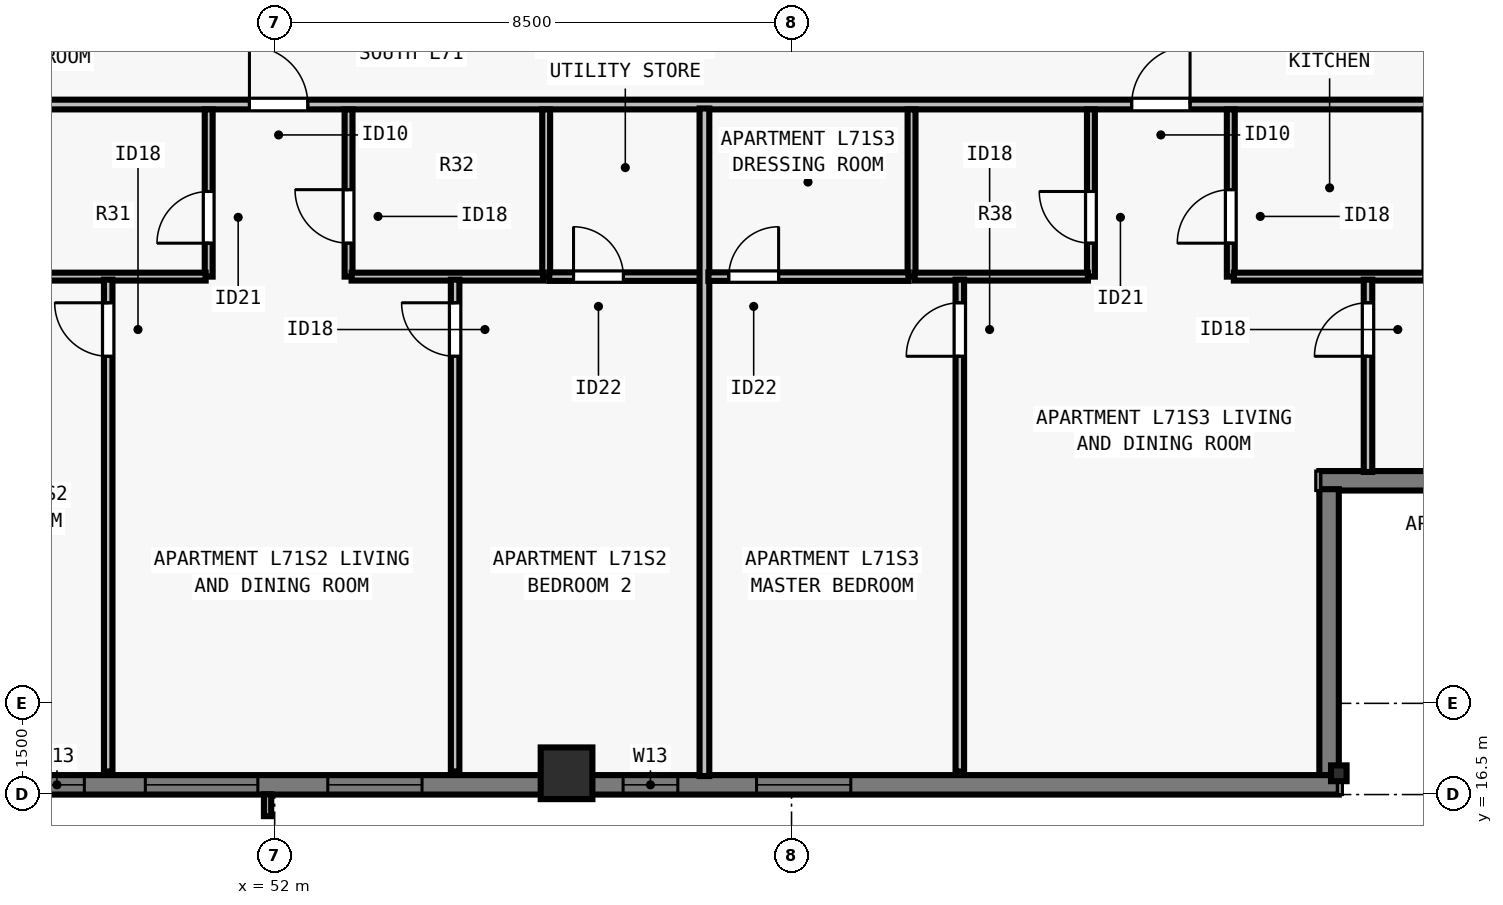
"""IFC4 building model, lengths in metres.
Left out: names, types, materials, properties, quantities, classifications, styles, units other than length and angle.
Written with IfcOpenShell. Run it as: python <this file> out.ifc"""

import sys

from ifc_helpers import new_model, si_unit, direction, frame, frame_2d, origin, origin_2d, place, context, subcontext, project, spatial, rectangle, i_section, extrude, element, fill, save


model = new_model("IFC4")
c1 = context("Model", 3, precision=1e-05, world=origin(), true_north=direction((0.0, 1.0)))
c2 = subcontext(c1, "Body", "Model", "MODEL_VIEW")
j1 = project(units=[si_unit("LENGTHUNIT", "METRE"), si_unit("PLANEANGLEUNIT", "RADIAN")], contexts=[c1])
p1 = place(None, origin())
s1 = spatial("IfcSite", under=j1, at=p1, CompositionType="ELEMENT")
p2 = place(p1, origin())
s2 = spatial("IfcBuilding", under=s1, at=p2, CompositionType="ELEMENT")
p3 = place(p2, frame((0.0, 0.0, 258.5)))
s3 = spatial("IfcBuildingStorey", under=s2, at=p3, CompositionType="ELEMENT", Elevation=258.5)
p4 = place(p3, frame((56.8, 16.85, 0.0), z_axis=(0.0, 0.0, 1.0), x_axis=(1.0, 0.0, 0.0)))
e1 = element("IfcColumn", 1, at=p4, inside=s3, PredefinedType="COLUMN", context=c2, shape_type="SweptSolid", body=[
    extrude(rectangle(XDim=0.85, YDim=0.85, at=origin_2d()), origin(), (0.0, 0.0, 1.0), 3.5),
])
p5 = place(p3, frame((69.5, 16.85, 0.0), z_axis=(0.0, 0.0, 1.0), x_axis=(1.0, 0.0, 0.0)))
e2 = element("IfcColumn", 2, at=p5, inside=s3, PredefinedType="COLUMN", context=c2, shape_type="SweptSolid", body=[
    extrude(i_section(OverallWidth=0.256, OverallDepth=0.26, WebThickness=0.01, FlangeThickness=0.017, FilletRadius=0.013, at=origin_2d()), origin(), (0.0, 0.0, 1.0), 3.5),
])
p6 = place(p3, frame((74.5, 21.66, 0.0), z_axis=(0.0, 0.0, 1.0), x_axis=(-1.0, 0.0, 0.0)))
e3 = element("IfcWall", 3, at=p6, inside=s3, PredefinedType="SOLIDWALL", context=c2, shape_type="SweptSolid", body=[
    extrude(rectangle(XDim=5.32, YDim=0.32, at=frame_2d((2.66, 0.0))), origin(), (0.0, 0.0, 1.0), 3.29),
])
p7 = place(p6, frame((0.63, 0.0, 0.8)))
e4 = element("IfcOpeningElement", 4, at=p7, cuts=e3, PredefinedType="OPENING", context=c2, shape_type="SweptSolid", body=[
    extrude(rectangle(XDim=0.9, YDim=1.678, at=frame_2d((0.45, 0.839))), frame((0.0, 0.17, 0.0), z_axis=(0.0, -1.0, 0.0), x_axis=(1.0, 0.0, 0.0)), (0.0, 0.0, 1.0), 0.34),
])
p8 = place(p3, frame((69.34, 21.522, 0.0), z_axis=(0.0, 0.0, 1.0), x_axis=(0.0, -1.0, 0.0)))
e5 = element("IfcWall", 5, at=p8, inside=s3, PredefinedType="SOLIDWALL", context=c2, shape_type="SweptSolid", body=[
    extrude(rectangle(XDim=4.724, YDim=0.32, at=frame_2d((2.362, 0.0))), origin(), (0.0, 0.0, 1.0), 3.29),
])
p9 = place(p3, frame((69.5, 16.66, 0.0), z_axis=(0.0, 0.0, 1.0), x_axis=(-1.0, 0.0, 0.0)))
e6 = element("IfcWall", 6, at=p9, inside=s3, PredefinedType="SOLIDWALL", context=c2, shape_type="SweptSolid", body=[
    extrude(rectangle(XDim=24.202, YDim=0.32, at=frame_2d((12.101, 0.0))), origin(), (0.0, 0.0, 1.0), 3.29),
])
p10 = place(p9, frame((8.026, 0.0, 0.8)))
e7 = element("IfcOpeningElement", 7, at=p10, cuts=e6, PredefinedType="OPENING", context=c2, shape_type="SweptSolid", body=[
    extrude(rectangle(XDim=1.55, YDim=1.678, at=frame_2d((0.775, 0.839))), frame((0.0, 0.17, 0.0), z_axis=(0.0, -1.0, 0.0), x_axis=(1.0, 0.0, 0.0)), (0.0, 0.0, 1.0), 0.34),
])
p11 = place(p9, frame((15.076, 0.0, 0.8)))
e8 = element("IfcOpeningElement", 8, at=p11, cuts=e6, PredefinedType="OPENING", context=c2, shape_type="SweptSolid", body=[
    extrude(rectangle(XDim=1.55, YDim=1.678, at=frame_2d((0.775, 0.839))), frame((0.0, 0.17, 0.0), z_axis=(0.0, -1.0, 0.0), x_axis=(1.0, 0.0, 0.0)), (0.0, 0.0, 1.0), 0.34),
])
p12 = place(p9, frame((17.777, 0.0, 0.8)))
e9 = element("IfcOpeningElement", 9, at=p12, cuts=e6, PredefinedType="OPENING", context=c2, shape_type="SweptSolid", body=[
    extrude(rectangle(XDim=1.85, YDim=1.678, at=frame_2d((0.925, 0.839))), frame((0.0, 0.17, 0.0), z_axis=(0.0, -1.0, 0.0), x_axis=(1.0, 0.0, 0.0)), (0.0, 0.0, 1.0), 0.34),
])
p13 = place(p9, frame((20.63, 0.0, 0.8)))
e10 = element("IfcOpeningElement", 10, at=p13, cuts=e6, PredefinedType="OPENING", context=c2, shape_type="SweptSolid", body=[
    extrude(rectangle(XDim=0.9, YDim=1.678, at=frame_2d((0.45, 0.839))), frame((0.0, 0.17, 0.0), z_axis=(0.0, -1.0, 0.0), x_axis=(1.0, 0.0, 0.0)), (0.0, 0.0, 1.0), 0.34),
])
p14 = place(p9, frame((10.87, 0.0, 0.8)))
e11 = element("IfcOpeningElement", 11, at=p14, cuts=e6, PredefinedType="OPENING", context=c2, shape_type="SweptSolid", body=[
    extrude(rectangle(XDim=0.9, YDim=1.678, at=frame_2d((0.45, 0.839))), frame((0.0, 0.17, 0.0), z_axis=(0.0, -1.0, 0.0), x_axis=(1.0, 0.0, 0.0)), (0.0, 0.0, 1.0), 0.34),
])
p15 = place(p3, frame((29.805, 27.847, 0.0), z_axis=(0.0, 0.0, 1.0), x_axis=(1.0, 0.0, 0.0)))
e12 = element("IfcWall", 12, at=p15, inside=s3, PredefinedType="PARTITIONING", context=c2, shape_type="SweptSolid", body=[
    extrude(rectangle(XDim=44.39, YDim=0.16, at=frame_2d((22.195, 0.0))), origin(), (0.0, 0.0, 1.0), 2.958),
])
p16 = place(p15, frame((7.206, 0.0, 0.0)))
e13 = element("IfcOpeningElement", 13, at=p16, cuts=e12, PredefinedType="OPENING", context=c2, shape_type="SweptSolid", body=[
    extrude(rectangle(XDim=0.96, YDim=2.18, at=frame_2d((0.48, 1.09))), frame((0.0, 0.09, 0.0), z_axis=(0.0, -1.0, 0.0), x_axis=(1.0, 0.0, 0.0)), (0.0, 0.0, 1.0), 0.18),
])
p17 = place(p15, frame((21.78, 0.0, 0.0)))
e14 = element("IfcOpeningElement", 14, at=p17, cuts=e12, PredefinedType="OPENING", context=c2, shape_type="SweptSolid", body=[
    extrude(rectangle(XDim=0.96, YDim=2.18, at=frame_2d((0.48, 1.09))), frame((0.0, 0.09, 0.0), z_axis=(0.0, -1.0, 0.0), x_axis=(1.0, 0.0, 0.0)), (0.0, 0.0, 1.0), 0.18),
])
p18 = place(p15, frame((36.289, 0.0, 0.0)))
e15 = element("IfcOpeningElement", 15, at=p18, cuts=e12, PredefinedType="OPENING", context=c2, shape_type="SweptSolid", body=[
    extrude(rectangle(XDim=0.96, YDim=2.18, at=frame_2d((0.48, 1.09))), frame((0.0, 0.09, 0.0), z_axis=(0.0, -1.0, 0.0), x_axis=(1.0, 0.0, 0.0)), (0.0, 0.0, 1.0), 0.18),
])
p19 = place(p3, frame((50.915, 25.018, 0.0), z_axis=(0.0, 0.0, 1.0), x_axis=(0.0, 1.0, 0.0)))
e16 = element("IfcWall", 16, at=p19, inside=s3, PredefinedType="PLUMBINGWALL", context=c2, shape_type="SweptSolid", body=[
    extrude(rectangle(XDim=2.75, YDim=0.13, at=frame_2d((1.375, 0.0))), origin(), (0.0, 0.0, 1.0), 3.29),
])
p20 = place(p19, frame((0.55, 0.0, 0.0)))
e17 = element("IfcOpeningElement", 17, at=p20, cuts=e16, PredefinedType="OPENING", context=c2, shape_type="SweptSolid", body=[
    extrude(rectangle(XDim=0.85, YDim=2.08, at=frame_2d((0.425, 1.04))), frame((0.0, 0.075, 0.0), z_axis=(0.0, -1.0, 0.0), x_axis=(1.0, 0.0, 0.0)), (0.0, 0.0, 1.0), 0.15),
])
p21 = place(p3, frame((48.015, 25.018, 0.0), z_axis=(0.0, 0.0, 1.0), x_axis=(1.0, 0.0, 0.0)))
e18 = element("IfcWall", 18, at=p21, inside=s3, PredefinedType="PLUMBINGWALL", context=c2, shape_type="SweptSolid", body=[
    extrude(rectangle(XDim=2.85, YDim=0.13, at=frame_2d((1.425, 0.0))), origin(), (0.0, 0.0, 1.0), 3.29),
])
p22 = place(p3, frame((56.465, 25.018, 0.0), z_axis=(0.0, 0.0, 1.0), x_axis=(0.0, 1.0, 0.0)))
e19 = element("IfcWall", 19, at=p22, inside=s3, PredefinedType="PLUMBINGWALL", context=c2, shape_type="SweptSolid", body=[
    extrude(rectangle(XDim=2.75, YDim=0.13, at=frame_2d((1.375, 0.0))), origin(), (0.0, 0.0, 1.0), 3.29),
])
p23 = place(p3, frame((53.215, 25.018, 0.0), z_axis=(0.0, 0.0, 1.0), x_axis=(0.0, 1.0, 0.0)))
e20 = element("IfcWall", 20, at=p23, inside=s3, PredefinedType="PLUMBINGWALL", context=c2, shape_type="SweptSolid", body=[
    extrude(rectangle(XDim=2.75, YDim=0.13, at=frame_2d((1.375, 0.0))), origin(), (0.0, 0.0, 1.0), 2.958),
])
p24 = place(p23, frame((0.55, 0.0, 0.0)))
e21 = element("IfcOpeningElement", 21, at=p24, cuts=e20, PredefinedType="OPENING", context=c2, shape_type="SweptSolid", body=[
    extrude(rectangle(XDim=0.88, YDim=2.1, at=frame_2d((0.44, 1.05))), frame((0.0, 0.075, 0.0), z_axis=(0.0, -1.0, 0.0), x_axis=(1.0, 0.0, 0.0)), (0.0, 0.0, 1.0), 0.15),
])
p25 = place(p3, frame((53.265, 25.018, 0.0), z_axis=(0.0, 0.0, 1.0), x_axis=(1.0, 0.0, 0.0)))
e22 = element("IfcWall", 22, at=p25, inside=s3, PredefinedType="PLUMBINGWALL", context=c2, shape_type="SweptSolid", body=[
    extrude(rectangle(XDim=3.15, YDim=0.13, at=frame_2d((1.575, 0.0))), origin(), (0.0, 0.0, 1.0), 3.29),
])
p26 = place(p3, frame((49.262, 16.88, 0.0), z_axis=(0.0, 0.0, 1.0), x_axis=(0.0, 1.0, 0.0)))
e23 = element("IfcWall", 23, at=p26, inside=s3, PredefinedType="PARTITIONING", context=c2, shape_type="SweptSolid", body=[
    extrude(rectangle(XDim=8.088, YDim=0.14, at=frame_2d((4.044, 0.0))), origin(), (0.0, 0.0, 1.0), 2.958),
])
p27 = place(p26, frame((6.827, 0.0, 0.0)))
e24 = element("IfcOpeningElement", 24, at=p27, cuts=e23, PredefinedType="OPENING", context=c2, shape_type="SweptSolid", body=[
    extrude(rectangle(XDim=0.88, YDim=2.1, at=frame_2d((0.44, 1.05))), frame((0.0, 0.08, 0.0), z_axis=(0.0, -1.0, 0.0), x_axis=(1.0, 0.0, 0.0)), (0.0, 0.0, 1.0), 0.16),
])
p28 = place(p3, frame((54.968, 16.88, 0.0), z_axis=(0.0, 0.0, 1.0), x_axis=(0.0, 1.0, 0.0)))
e25 = element("IfcWall", 25, at=p28, inside=s3, PredefinedType="PARTITIONING", context=c2, shape_type="SweptSolid", body=[
    extrude(rectangle(XDim=8.088, YDim=0.14, at=frame_2d((4.044, 0.0))), origin(), (0.0, 0.0, 1.0), 3.29),
])
p29 = place(p28, frame((6.827, 0.0, 0.0)))
e26 = element("IfcOpeningElement", 26, at=p29, cuts=e25, PredefinedType="OPENING", context=c2, shape_type="SweptSolid", body=[
    extrude(rectangle(XDim=0.88, YDim=2.1, at=frame_2d((0.44, 1.05))), frame((0.0, 0.08, 0.0), z_axis=(0.0, -1.0, 0.0), x_axis=(1.0, 0.0, 0.0)), (0.0, 0.0, 1.0), 0.16),
])
p30 = place(p3, frame((56.515, 25.018, 0.0), z_axis=(0.0, 0.0, 1.0), x_axis=(1.0, 0.0, 0.0)))
e27 = element("IfcWall", 27, at=p30, inside=s3, PredefinedType="PARTITIONING", context=c2, shape_type="SweptSolid", body=[
    extrude(rectangle(XDim=2.603, YDim=0.14, at=frame_2d((1.301, 0.0))), origin(), (0.0, 0.0, 1.0), 3.29),
])
p31 = place(p30, frame((0.4, 0.0, 0.0)))
e28 = element("IfcOpeningElement", 28, at=p31, cuts=e27, PredefinedType="OPENING", context=c2, shape_type="SweptSolid", body=[
    extrude(rectangle(XDim=0.82, YDim=2.1, at=frame_2d((0.41, 1.05))), frame((0.0, 0.08, 0.0), z_axis=(0.0, -1.0, 0.0), x_axis=(1.0, 0.0, 0.0)), (0.0, 0.0, 1.0), 0.16),
])
p32 = place(p3, frame((59.067, 16.805, 0.0), z_axis=(0.0, 0.0, 1.0), x_axis=(0.0, 1.0, 0.0)))
e29 = element("IfcWall", 29, at=p32, inside=s3, PredefinedType="PARTITIONING", context=c2, shape_type="SweptSolid", body=[
    extrude(rectangle(XDim=10.978, YDim=0.16, at=frame_2d((5.489, 0.0))), origin(), (0.0, 0.0, 1.0), 3.29),
])
p33 = place(p3, frame((62.474, 25.018, 0.0), z_axis=(0.0, 0.0, 1.0), x_axis=(0.0, 1.0, 0.0)))
e30 = element("IfcWall", 30, at=p33, inside=s3, PredefinedType="PLUMBINGWALL", context=c2, shape_type="SweptSolid", body=[
    extrude(rectangle(XDim=2.75, YDim=0.13, at=frame_2d((1.375, 0.0))), origin(), (0.0, 0.0, 1.0), 2.573),
])
p34 = place(p3, frame((65.424, 25.018, 0.0), z_axis=(0.0, 0.0, 1.0), x_axis=(0.0, 1.0, 0.0)))
e31 = element("IfcWall", 31, at=p34, inside=s3, PredefinedType="PLUMBINGWALL", context=c2, shape_type="SweptSolid", body=[
    extrude(rectangle(XDim=2.75, YDim=0.13, at=frame_2d((1.375, 0.0))), origin(), (0.0, 0.0, 1.0), 3.29),
])
p35 = place(p34, frame((0.55, 0.0, 0.0)))
e32 = element("IfcOpeningElement", 32, at=p35, cuts=e31, PredefinedType="OPENING", context=c2, shape_type="SweptSolid", body=[
    extrude(rectangle(XDim=0.85, YDim=2.08, at=frame_2d((0.425, 1.04))), frame((0.0, 0.075, 0.0), z_axis=(0.0, -1.0, 0.0), x_axis=(1.0, 0.0, 0.0)), (0.0, 0.0, 1.0), 0.15),
])
p36 = place(p3, frame((62.524, 25.018, 0.0), z_axis=(0.0, 0.0, 1.0), x_axis=(1.0, 0.0, 0.0)))
e33 = element("IfcWall", 33, at=p36, inside=s3, PredefinedType="PLUMBINGWALL", context=c2, shape_type="SweptSolid", body=[
    extrude(rectangle(XDim=2.85, YDim=0.13, at=frame_2d((1.425, 0.0))), origin(), (0.0, 0.0, 1.0), 3.29),
])
p37 = place(p3, frame((67.724, 25.018, 0.0), z_axis=(0.0, 0.0, 1.0), x_axis=(0.0, 1.0, 0.0)))
e34 = element("IfcWall", 34, at=p37, inside=s3, PredefinedType="PLUMBINGWALL", context=c2, shape_type="SweptSolid", body=[
    extrude(rectangle(XDim=2.75, YDim=0.13, at=frame_2d((1.375, 0.0))), origin(), (0.0, 0.0, 1.0), 3.29),
])
p38 = place(p37, frame((0.55, 0.0, 0.0)))
e35 = element("IfcOpeningElement", 35, at=p38, cuts=e34, PredefinedType="OPENING", context=c2, shape_type="SweptSolid", body=[
    extrude(rectangle(XDim=0.88, YDim=2.1, at=frame_2d((0.44, 1.05))), frame((0.0, 0.075, 0.0), z_axis=(0.0, -1.0, 0.0), x_axis=(1.0, 0.0, 0.0)), (0.0, 0.0, 1.0), 0.15),
])
p39 = place(p3, frame((67.774, 25.018, 0.0), z_axis=(0.0, 0.0, 1.0), x_axis=(1.0, 0.0, 0.0)))
e36 = element("IfcWall", 36, at=p39, inside=s3, PredefinedType="PLUMBINGWALL", context=c2, shape_type="SweptSolid", body=[
    extrude(rectangle(XDim=3.15, YDim=0.13, at=frame_2d((1.575, 0.0))), origin(), (0.0, 0.0, 1.0), 2.958),
])
p40 = place(p3, frame((63.268, 16.88, 0.0), z_axis=(0.0, 0.0, 1.0), x_axis=(0.0, 1.0, 0.0)))
e37 = element("IfcWall", 37, at=p40, inside=s3, PredefinedType="PARTITIONING", context=c2, shape_type="SweptSolid", body=[
    extrude(rectangle(XDim=8.088, YDim=0.14, at=frame_2d((4.044, 0.0))), origin(), (0.0, 0.0, 1.0), 3.29),
])
p41 = place(p40, frame((6.827, 0.0, 0.0)))
e38 = element("IfcOpeningElement", 38, at=p41, cuts=e37, PredefinedType="OPENING", context=c2, shape_type="SweptSolid", body=[
    extrude(rectangle(XDim=0.88, YDim=2.1, at=frame_2d((0.44, 1.05))), frame((0.0, 0.08, 0.0), z_axis=(0.0, -1.0, 0.0), x_axis=(1.0, 0.0, 0.0)), (0.0, 0.0, 1.0), 0.16),
])
p42 = place(p3, frame((59.133, 25.018, 0.0), z_axis=(0.0, 0.0, 1.0), x_axis=(1.0, 0.0, 0.0)))
e39 = element("IfcWall", 39, at=p42, inside=s3, PredefinedType="PARTITIONING", context=c2, shape_type="SweptSolid", body=[
    extrude(rectangle(XDim=3.291, YDim=0.14, at=frame_2d((1.646, 0.0))), origin(), (0.0, 0.0, 1.0), 3.29),
])
p43 = place(p42, frame((0.335, 0.0, 0.0)))
e40 = element("IfcOpeningElement", 40, at=p43, cuts=e39, PredefinedType="OPENING", context=c2, shape_type="SweptSolid", body=[
    extrude(rectangle(XDim=0.82, YDim=2.1, at=frame_2d((0.41, 1.05))), frame((0.0, 0.08, 0.0), z_axis=(0.0, -1.0, 0.0), x_axis=(1.0, 0.0, 0.0)), (0.0, 0.0, 1.0), 0.16),
])
p44 = place(p3, frame((69.98, 21.805, 0.0), z_axis=(0.0, 0.0, 1.0), x_axis=(0.0, 1.0, 0.0)))
e41 = element("IfcWall", 41, at=p44, inside=s3, PredefinedType="PARTITIONING", context=c2, shape_type="SweptSolid", body=[
    extrude(rectangle(XDim=3.163, YDim=0.14, at=frame_2d((1.581, 0.0))), origin(), (0.0, 0.0, 1.0), 3.29),
])
p45 = place(p44, frame((1.903, 0.0, 0.0)))
e42 = element("IfcOpeningElement", 42, at=p45, cuts=e41, PredefinedType="OPENING", context=c2, shape_type="SweptSolid", body=[
    extrude(rectangle(XDim=0.88, YDim=2.1, at=frame_2d((0.44, 1.05))), frame((0.0, 0.08, 0.0), z_axis=(0.0, -1.0, 0.0), x_axis=(1.0, 0.0, 0.0)), (0.0, 0.0, 1.0), 0.16),
])
p46 = place(p10, origin())
e43 = element("IfcWindow", 43, at=p46, inside=s3, PartitioningType="SINGLE_PANEL", PredefinedType="WINDOW", context=c2, shape_type="SweptSolid", body=[
    extrude(rectangle(XDim=1.55, YDim=1.678, at=frame_2d((0.775, 0.839))), frame((0.0, -0.05, 0.0), z_axis=(0.0, -1.0, 0.0), x_axis=(1.0, 0.0, 0.0)), (0.0, 0.0, 1.0), 0.06),
])
fill(e7, e43)
p47 = place(p11, origin())
e44 = element("IfcWindow", 44, at=p47, inside=s3, PartitioningType="SINGLE_PANEL", PredefinedType="WINDOW", context=c2, shape_type="SweptSolid", body=[
    extrude(rectangle(XDim=1.55, YDim=1.678, at=frame_2d((0.775, 0.839))), frame((0.0, -0.05, 0.0), z_axis=(0.0, -1.0, 0.0), x_axis=(1.0, 0.0, 0.0)), (0.0, 0.0, 1.0), 0.06),
])
fill(e8, e44)
p48 = place(p12, origin())
e45 = element("IfcWindow", 45, at=p48, inside=s3, PartitioningType="SINGLE_PANEL", PredefinedType="WINDOW", context=c2, shape_type="SweptSolid", body=[
    extrude(rectangle(XDim=1.85, YDim=1.678, at=frame_2d((0.925, 0.839))), frame((0.0, -0.05, 0.0), z_axis=(0.0, -1.0, 0.0), x_axis=(1.0, 0.0, 0.0)), (0.0, 0.0, 1.0), 0.06),
])
fill(e9, e45)
p49 = place(p13, origin())
e46 = element("IfcWindow", 46, at=p49, inside=s3, PartitioningType="SINGLE_PANEL", PredefinedType="WINDOW", context=c2, shape_type="SweptSolid", body=[
    extrude(rectangle(XDim=0.9, YDim=1.678, at=frame_2d((0.45, 0.839))), frame((0.0, -0.04, 0.0), z_axis=(0.0, -1.0, 0.0), x_axis=(1.0, 0.0, 0.0)), (0.0, 0.0, 1.0), 0.06),
])
fill(e10, e46)
p50 = place(p14, origin())
e47 = element("IfcWindow", 47, at=p50, inside=s3, PartitioningType="SINGLE_PANEL", PredefinedType="WINDOW", context=c2, shape_type="SweptSolid", body=[
    extrude(rectangle(XDim=0.9, YDim=1.678, at=frame_2d((0.45, 0.839))), frame((0.0, -0.04, 0.0), z_axis=(0.0, -1.0, 0.0), x_axis=(1.0, 0.0, 0.0)), (0.0, 0.0, 1.0), 0.06),
])
fill(e11, e47)
p51 = place(p20, origin())
e48 = element("IfcDoor", 48, at=p51, inside=s3, OperationType="SINGLE_SWING_LEFT", PredefinedType="DOOR", context=c2, shape_type="SweptSolid", body=[
    extrude(rectangle(XDim=0.85, YDim=2.08, at=frame_2d((0.425, 1.04))), frame((0.0, 0.025, 0.0), z_axis=(0.0, -1.0, 0.0), x_axis=(1.0, 0.0, 0.0)), (0.0, 0.0, 1.0), 0.05),
])
fill(e17, e48)
p52 = place(p24, origin())
e49 = element("IfcDoor", 49, at=p52, inside=s3, OperationType="SINGLE_SWING_RIGHT", PredefinedType="DOOR", context=c2, shape_type="SweptSolid", body=[
    extrude(rectangle(XDim=0.88, YDim=2.1, at=frame_2d((0.44, 1.05))), frame((0.0, 0.025, 0.0), z_axis=(0.0, -1.0, 0.0), x_axis=(1.0, 0.0, 0.0)), (0.0, 0.0, 1.0), 0.05),
])
fill(e21, e49)
p53 = place(p27, origin())
e50 = element("IfcDoor", 50, at=p53, inside=s3, OperationType="SINGLE_SWING_RIGHT", PredefinedType="DOOR", context=c2, shape_type="SweptSolid", body=[
    extrude(rectangle(XDim=0.88, YDim=2.1, at=frame_2d((0.44, 1.05))), frame((0.0, 0.025, 0.0), z_axis=(0.0, -1.0, 0.0), x_axis=(1.0, 0.0, 0.0)), (0.0, 0.0, 1.0), 0.05),
])
fill(e24, e50)
p54 = place(p31, origin())
e51 = element("IfcDoor", 51, at=p54, inside=s3, OperationType="SINGLE_SWING_LEFT", PredefinedType="DOOR", context=c2, shape_type="SweptSolid", body=[
    extrude(rectangle(XDim=0.82, YDim=2.1, at=frame_2d((0.41, 1.05))), frame((0.0, 0.025, 0.0), z_axis=(0.0, -1.0, 0.0), x_axis=(1.0, 0.0, 0.0)), (0.0, 0.0, 1.0), 0.05),
])
fill(e28, e51)
p55 = place(p29, origin())
e52 = element("IfcDoor", 52, at=p55, inside=s3, OperationType="SINGLE_SWING_RIGHT", PredefinedType="DOOR", context=c2, shape_type="SweptSolid", body=[
    extrude(rectangle(XDim=0.88, YDim=2.1, at=frame_2d((0.44, 1.05))), frame((0.0, 0.025, 0.0), z_axis=(0.0, -1.0, 0.0), x_axis=(1.0, 0.0, 0.0)), (0.0, 0.0, 1.0), 0.05),
])
fill(e26, e52)
p56 = place(p17, origin())
e53 = element("IfcDoor", 53, at=p56, inside=s3, OperationType="SINGLE_SWING_LEFT", PredefinedType="DOOR", context=c2, shape_type="SweptSolid", body=[
    extrude(rectangle(XDim=0.96, YDim=2.18, at=frame_2d((0.48, 1.09))), frame((0.0, 0.025, 0.0), z_axis=(0.0, -1.0, 0.0), x_axis=(1.0, 0.0, 0.0)), (0.0, 0.0, 1.0), 0.05),
])
fill(e14, e53)
p57 = place(p35, origin())
e54 = element("IfcDoor", 54, at=p57, inside=s3, OperationType="SINGLE_SWING_RIGHT", PredefinedType="DOOR", context=c2, shape_type="SweptSolid", body=[
    extrude(rectangle(XDim=0.85, YDim=2.08, at=frame_2d((0.425, 1.04))), frame((0.0, 0.025, 0.0), z_axis=(0.0, -1.0, 0.0), x_axis=(1.0, 0.0, 0.0)), (0.0, 0.0, 1.0), 0.05),
])
fill(e32, e54)
p58 = place(p38, origin())
e55 = element("IfcDoor", 55, at=p58, inside=s3, OperationType="SINGLE_SWING_LEFT", PredefinedType="DOOR", context=c2, shape_type="SweptSolid", body=[
    extrude(rectangle(XDim=0.88, YDim=2.1, at=frame_2d((0.44, 1.05))), frame((0.0, 0.025, 0.0), z_axis=(0.0, -1.0, 0.0), x_axis=(1.0, 0.0, 0.0)), (0.0, 0.0, 1.0), 0.05),
])
fill(e35, e55)
p59 = place(p43, origin())
e56 = element("IfcDoor", 56, at=p59, inside=s3, OperationType="SINGLE_SWING_RIGHT", PredefinedType="DOOR", context=c2, shape_type="SweptSolid", body=[
    extrude(rectangle(XDim=0.82, YDim=2.1, at=frame_2d((0.41, 1.05))), frame((0.0, 0.025, 0.0), z_axis=(0.0, -1.0, 0.0), x_axis=(1.0, 0.0, 0.0)), (0.0, 0.0, 1.0), 0.05),
])
fill(e40, e56)
p60 = place(p41, origin())
e57 = element("IfcDoor", 57, at=p60, inside=s3, OperationType="SINGLE_SWING_LEFT", PredefinedType="DOOR", context=c2, shape_type="SweptSolid", body=[
    extrude(rectangle(XDim=0.88, YDim=2.1, at=frame_2d((0.44, 1.05))), frame((0.0, 0.025, 0.0), z_axis=(0.0, -1.0, 0.0), x_axis=(1.0, 0.0, 0.0)), (0.0, 0.0, 1.0), 0.05),
])
fill(e38, e57)
p61 = place(p45, origin())
e58 = element("IfcDoor", 58, at=p61, inside=s3, OperationType="SINGLE_SWING_LEFT", PredefinedType="DOOR", context=c2, shape_type="SweptSolid", body=[
    extrude(rectangle(XDim=0.88, YDim=2.1, at=frame_2d((0.44, 1.05))), frame((0.0, 0.025, 0.0), z_axis=(0.0, -1.0, 0.0), x_axis=(1.0, 0.0, 0.0)), (0.0, 0.0, 1.0), 0.05),
])
fill(e42, e58)
p62 = place(p18, origin())
e59 = element("IfcDoor", 59, at=p62, inside=s3, OperationType="SINGLE_SWING_RIGHT", PredefinedType="DOOR", context=c2, shape_type="SweptSolid", body=[
    extrude(rectangle(XDim=0.96, YDim=2.18, at=frame_2d((0.48, 1.09))), frame((0.0, 0.025, 0.0), z_axis=(0.0, -1.0, 0.0), x_axis=(1.0, 0.0, 0.0)), (0.0, 0.0, 1.0), 0.05),
])
fill(e15, e59)
save(model, sys.argv[1])
